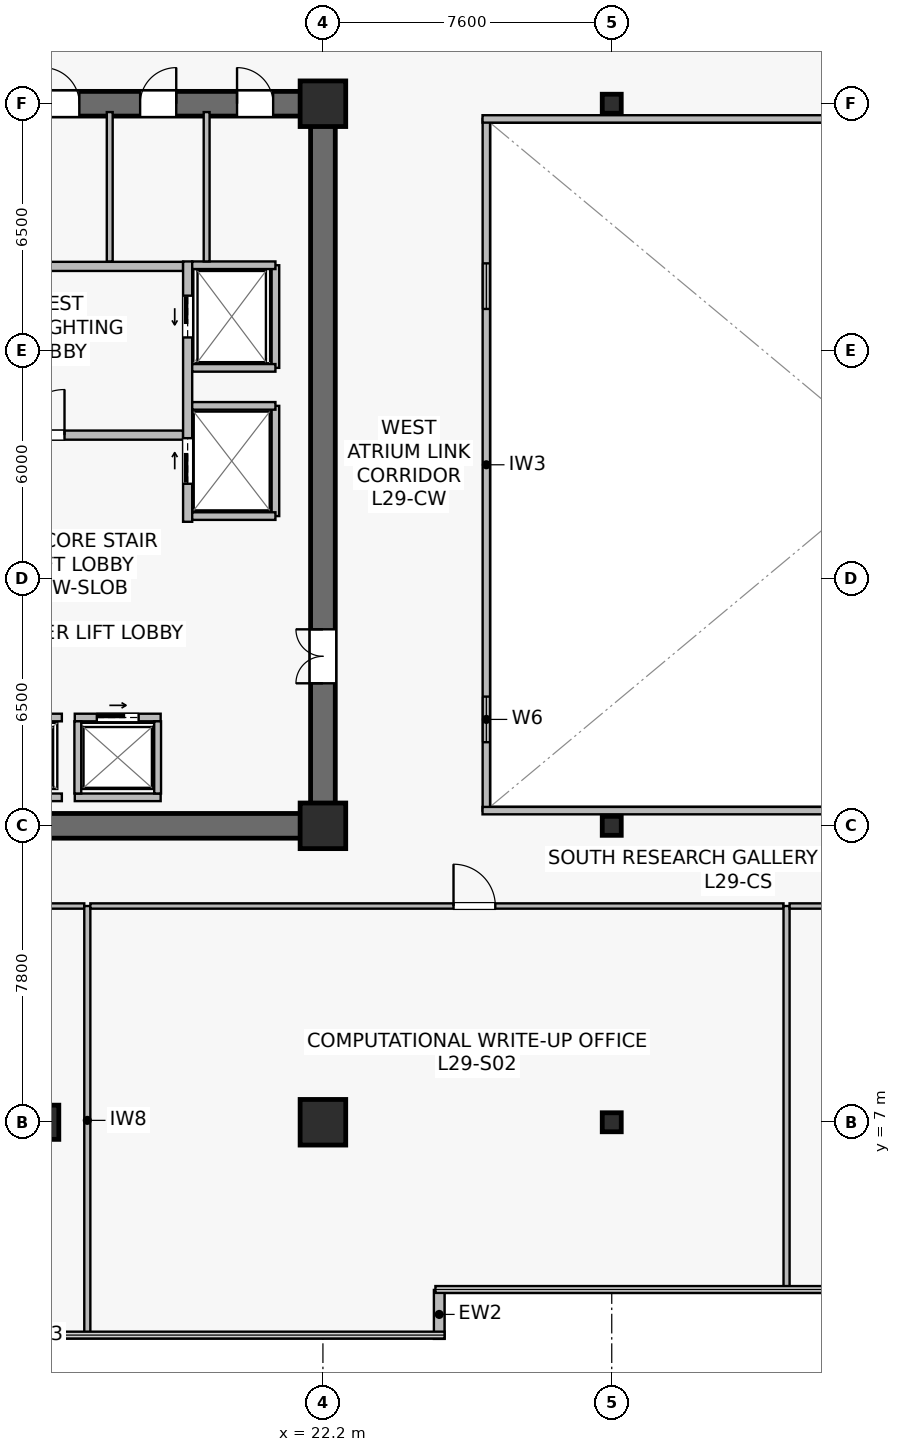
"""IFC4 building model, lengths in metres.
Left out: names, types, materials, properties, quantities, classifications, styles, units other than length and angle.
Written with IfcOpenShell. Run it as: python <this file> out.ifc"""

import sys

from ifc_helpers import new_model, si_unit, direction, frame, frame_2d, origin, origin_2d, place, context, subcontext, project, spatial, rectangle, hollow_rectangle, extrude, source, transform, mapped, element, fill, save


model = new_model("IFC4")
c1 = context("Model", 3, precision=1e-05, world=origin(), true_north=direction((0.0, 1.0)))
c2 = subcontext(c1, "Body", "Model", "MODEL_VIEW")
j1 = project(units=[si_unit("LENGTHUNIT", "METRE"), si_unit("PLANEANGLEUNIT", "RADIAN")], contexts=[c1])
p1 = place(None, origin())
s1 = spatial("IfcSite", under=j1, at=p1, CompositionType="ELEMENT")
p2 = place(p1, origin())
s2 = spatial("IfcBuilding", under=s1, at=p2, CompositionType="ELEMENT")
p3 = place(p2, frame((0.0, 0.0, 121.5)))
s3 = spatial("IfcBuildingStorey", under=s2, at=p3, CompositionType="ELEMENT", Elevation=121.5)
p4 = place(p3, frame((7.075, 14.8, 0.0), z_axis=(0.0, 0.0, 1.0), x_axis=(1.0, 0.0, 0.0)))
e1 = element("IfcWall", 1, at=p4, inside=s3, PredefinedType="SHEAR", context=c2, shape_type="SweptSolid", body=[
    extrude(rectangle(XDim=15.45, YDim=0.65, at=frame_2d((7.725, 0.0))), origin(), (0.0, 0.0, 1.0), 3.79),
])
p5 = place(p3, frame((7.075, 33.8, 0.0), z_axis=(0.0, 0.0, 1.0), x_axis=(1.0, 0.0, 0.0)))
e2 = element("IfcWall", 2, at=p5, inside=s3, PredefinedType="SHEAR", context=c2, shape_type="SweptSolid", body=[
    extrude(rectangle(XDim=15.45, YDim=0.65, at=frame_2d((7.725, 0.0))), origin(), (0.0, 0.0, 1.0), 3.79),
])
p6 = place(p5, frame((5.25, 0.0, 0.0)))
e3 = element("IfcOpeningElement", 3, at=p6, cuts=e2, PredefinedType="OPENING", context=c2, shape_type="SweptSolid", body=[
    extrude(rectangle(XDim=0.95, YDim=2.15, at=frame_2d((0.475, 1.075))), frame((0.0, 0.335, 0.0), z_axis=(0.0, -1.0, 0.0), x_axis=(1.0, 0.0, 0.0)), (0.0, 0.0, 1.0), 0.67),
])
p7 = place(p5, frame((7.765, 0.0, 0.0)))
e4 = element("IfcOpeningElement", 4, at=p7, cuts=e2, PredefinedType="OPENING", context=c2, shape_type="SweptSolid", body=[
    extrude(rectangle(XDim=0.95, YDim=2.15, at=frame_2d((0.475, 1.075))), frame((0.0, 0.335, 0.0), z_axis=(0.0, -1.0, 0.0), x_axis=(1.0, 0.0, 0.0)), (0.0, 0.0, 1.0), 0.67),
])
p8 = place(p5, frame((10.315, 0.0, 0.0)))
e5 = element("IfcOpeningElement", 5, at=p8, cuts=e2, PredefinedType="OPENING", context=c2, shape_type="SweptSolid", body=[
    extrude(rectangle(XDim=0.95, YDim=2.15, at=frame_2d((0.475, 1.075))), frame((0.0, 0.335, 0.0), z_axis=(0.0, -1.0, 0.0), x_axis=(1.0, 0.0, 0.0)), (0.0, 0.0, 1.0), 0.67),
])
p9 = place(p5, frame((12.865, 0.0, 0.0)))
e6 = element("IfcOpeningElement", 6, at=p9, cuts=e2, PredefinedType="OPENING", context=c2, shape_type="SweptSolid", body=[
    extrude(rectangle(XDim=0.95, YDim=2.15, at=frame_2d((0.475, 1.075))), frame((0.0, 0.335, 0.0), z_axis=(0.0, -1.0, 0.0), x_axis=(1.0, 0.0, 0.0)), (0.0, 0.0, 1.0), 0.67),
])
p10 = place(p3, frame((22.2, 15.125, 0.0), z_axis=(0.0, 0.0, 1.0), x_axis=(0.0, 1.0, 0.0)))
e7 = element("IfcWall", 7, at=p10, inside=s3, PredefinedType="SHEAR", context=c2, shape_type="SweptSolid", body=[
    extrude(rectangle(XDim=18.35, YDim=0.65, at=frame_2d((9.175, 0.0))), origin(), (0.0, 0.0, 1.0), 3.79),
])
p11 = place(p10, frame((3.425, 0.0, 0.0)))
e8 = element("IfcOpeningElement", 8, at=p11, cuts=e7, PredefinedType="OPENING", context=c2, shape_type="SweptSolid", body=[
    extrude(rectangle(XDim=1.42, YDim=2.2, at=frame_2d((0.71, 1.1))), frame((0.0, 0.335, 0.0), z_axis=(0.0, -1.0, 0.0), x_axis=(1.0, 0.0, 0.0)), (0.0, 0.0, 1.0), 0.67),
])
m1 = source(origin(), c2, "Body", "SweptSolid", [
    extrude(rectangle(XDim=0.9, YDim=0.9, at=origin_2d()), origin(), (0.0, 0.0, 1.0), 4.1),
])
p12 = place(p3, frame((14.8, 7.0, 0.0), z_axis=(0.0, 0.0, 1.0), x_axis=(1.0, 0.0, 0.0)))
e9 = element("IfcColumn", 9, at=p12, inside=s3, PredefinedType="COLUMN", context=c2, shape_type="MappedRepresentation", body=[
    mapped(m1, transform((0.0, 0.0, 0.0), scale=1.0)),
])
m2 = source(origin(), c2, "Body", "SweptSolid", [
    extrude(rectangle(XDim=1.2, YDim=1.2, at=origin_2d()), origin(), (0.0, 0.0, 1.0), 4.1),
])
for number, where, z_axis, x_axis in (
    (10, (22.2, 7.0, 0.0), (0.0, 0.0, 1.0), (1.0, 0.0, 0.0)),
    (11, (22.2, 14.8, 0.0), (0.0, 0.0, 1.0), (1.0, 0.0, 0.0)),
    (12, (22.2, 33.8, 0.0), (0.0, 0.0, 1.0), (1.0, 0.0, 0.0)),
):
    element("IfcColumn", number, at=place(p3, frame(where, z_axis=z_axis, x_axis=x_axis)), inside=s3, PredefinedType="COLUMN", context=c2, shape_type="MappedRepresentation", body=[
        mapped(m2, transform((0.0, 0.0, 0.0), scale=1.0)),
    ])
m3 = source(origin(), c2, "Body", "SweptSolid", [
    extrude(hollow_rectangle(XDim=0.5, YDim=0.5, WallThickness=0.022, at=origin_2d()), origin(), (0.0, 0.0, 1.0), 4.1),
])
for number, where, z_axis, x_axis in (
    (13, (29.8, 7.0, 0.0), (0.0, 0.0, 1.0), (1.0, 0.0, 0.0)),
    (14, (29.8, 14.8, 0.0), (0.0, 0.0, 1.0), (1.0, 0.0, 0.0)),
    (15, (29.8, 33.8, 0.0), (0.0, 0.0, 1.0), (1.0, 0.0, 0.0)),
):
    element("IfcColumn", number, at=place(p3, frame(where, z_axis=z_axis, x_axis=x_axis)), inside=s3, PredefinedType="COLUMN", context=c2, shape_type="MappedRepresentation", body=[
        mapped(m3, transform((0.0, 0.0, 0.0), scale=1.0)),
    ])
p13 = place(p3, frame((25.26, 1.3, 0.0), z_axis=(0.0, 0.0, 1.0), x_axis=(0.0, 1.0, 0.0)))
e16 = element("IfcWall", 16, at=p13, inside=s3, PredefinedType="STANDARD", context=c2, shape_type="SweptSolid", body=[
    extrude(rectangle(XDim=1.288, YDim=0.28, at=frame_2d((0.644, 0.0))), origin(), (0.0, 0.0, 1.0), 3.79),
])
p14 = place(p3, frame((11.6, 25.08, 0.0), z_axis=(0.0, 0.0, 1.0), x_axis=(1.0, 0.0, 0.0)))
e17 = element("IfcWall", 17, at=p14, inside=s3, PredefinedType="SOLIDWALL", context=c2, shape_type="SweptSolid", body=[
    extrude(rectangle(XDim=6.92, YDim=0.24, at=frame_2d((3.46, 0.0))), origin(), (0.0, 0.0, 1.0), 3.125),
])
p15 = place(p14, frame((2.6, 0.0, 0.0)))
e18 = element("IfcOpeningElement", 18, at=p15, cuts=e17, PredefinedType="OPENING", context=c2, shape_type="SweptSolid", body=[
    extrude(rectangle(XDim=1.2, YDim=2.16, at=frame_2d((0.6, 1.08))), frame((0.0, 0.13, 0.0), z_axis=(0.0, -1.0, 0.0), x_axis=(1.0, 0.0, 0.0)), (0.0, 0.0, 1.0), 0.26),
])
p16 = place(p3, frame((11.6, 29.52, 0.0), z_axis=(0.0, 0.0, 1.0), x_axis=(1.0, 0.0, 0.0)))
e19 = element("IfcWall", 19, at=p16, inside=s3, PredefinedType="SOLIDWALL", context=c2, shape_type="SweptSolid", body=[
    extrude(rectangle(XDim=6.92, YDim=0.24, at=frame_2d((3.46, 0.0))), origin(), (0.0, 0.0, 1.0), 3.125),
])
p17 = place(p3, frame((18.64, 22.8, 0.0), z_axis=(0.0, 0.0, 1.0), x_axis=(0.0, 1.0, 0.0)))
e20 = element("IfcWall", 20, at=p17, inside=s3, PredefinedType="SOLIDWALL", context=c2, shape_type="SweptSolid", body=[
    extrude(rectangle(XDim=6.85, YDim=0.24, at=frame_2d((3.425, 0.0))), origin(), (0.0, 0.0, 1.0), 2.875),
])
p18 = place(p17, frame((4.85, 0.0, 0.0)))
e21 = element("IfcOpeningElement", 21, at=p18, cuts=e20, PredefinedType="OPENING", context=c2, shape_type="SweptSolid", body=[
    extrude(rectangle(XDim=1.1, YDim=2.22, at=frame_2d((0.55, 1.11))), frame((0.0, 0.13, 0.0), z_axis=(0.0, -1.0, 0.0), x_axis=(1.0, 0.0, 0.0)), (0.0, 0.0, 1.0), 0.26),
])
p19 = place(p17, frame((1.0, 0.0, 0.0)))
e22 = element("IfcOpeningElement", 22, at=p19, cuts=e20, PredefinedType="OPENING", context=c2, shape_type="SweptSolid", body=[
    extrude(rectangle(XDim=1.2, YDim=2.22, at=frame_2d((0.6, 1.11))), frame((0.0, 0.13, 0.0), z_axis=(0.0, -1.0, 0.0), x_axis=(1.0, 0.0, 0.0)), (0.0, 0.0, 1.0), 0.26),
])
p20 = place(p3, frame((13.07, 17.65, 0.0), z_axis=(0.0, 0.0, 1.0), x_axis=(1.0, 0.0, 0.0)))
e23 = element("IfcWall", 23, at=p20, inside=s3, PredefinedType="SOLIDWALL", context=c2, shape_type="SweptSolid", body=[
    extrude(rectangle(XDim=2.26, YDim=0.2, at=frame_2d((1.13, 0.0))), origin(), (0.0, 0.0, 1.0), 3.125),
])
p21 = place(p20, frame((0.58, 0.0, 0.0)))
e24 = element("IfcOpeningElement", 24, at=p21, cuts=e23, PredefinedType="OPENING", context=c2, shape_type="SweptSolid", body=[
    extrude(rectangle(XDim=1.1, YDim=2.22, at=frame_2d((0.55, 1.11))), frame((0.0, 0.11, 0.0), z_axis=(0.0, -1.0, 0.0), x_axis=(1.0, 0.0, 0.0)), (0.0, 0.0, 1.0), 0.22),
])
p22 = place(p3, frame((13.07, 15.55, 0.0), z_axis=(0.0, 0.0, 1.0), x_axis=(1.0, 0.0, 0.0)))
e25 = element("IfcWall", 25, at=p22, inside=s3, PredefinedType="SOLIDWALL", context=c2, shape_type="SweptSolid", body=[
    extrude(rectangle(XDim=2.26, YDim=0.2, at=frame_2d((1.13, 0.0))), origin(), (0.0, 0.0, 1.0), 3.125),
])
p23 = place(p3, frame((15.67, 17.65, 0.0), z_axis=(0.0, 0.0, 1.0), x_axis=(1.0, 0.0, 0.0)))
e26 = element("IfcWall", 26, at=p23, inside=s3, PredefinedType="SOLIDWALL", context=c2, shape_type="SweptSolid", body=[
    extrude(rectangle(XDim=2.26, YDim=0.2, at=frame_2d((1.13, 0.0))), origin(), (0.0, 0.0, 1.0), 3.79),
])
p24 = place(p23, frame((0.58, 0.0, 0.0)))
e27 = element("IfcOpeningElement", 27, at=p24, cuts=e26, PredefinedType="OPENING", context=c2, shape_type="SweptSolid", body=[
    extrude(rectangle(XDim=1.1, YDim=2.22, at=frame_2d((0.55, 1.11))), frame((0.0, 0.11, 0.0), z_axis=(0.0, -1.0, 0.0), x_axis=(1.0, 0.0, 0.0)), (0.0, 0.0, 1.0), 0.22),
])
p25 = place(p3, frame((15.67, 15.55, 0.0), z_axis=(0.0, 0.0, 1.0), x_axis=(1.0, 0.0, 0.0)))
e28 = element("IfcWall", 28, at=p25, inside=s3, PredefinedType="SOLIDWALL", context=c2, shape_type="SweptSolid", body=[
    extrude(rectangle(XDim=2.26, YDim=0.2, at=frame_2d((1.13, 0.0))), origin(), (0.0, 0.0, 1.0), 3.79),
])
for number, where, z_axis, x_axis in (
    (29, (15.75, 15.65, 0.0), (0.0, 0.0, 1.0), (0.0, 1.0, 0.0)),
    (30, (17.85, 15.65, 0.0), (0.0, 0.0, 1.0), (0.0, 1.0, 0.0)),
):
    element("IfcWall", number, at=place(p3, frame(where, z_axis=z_axis, x_axis=x_axis)), inside=s3, PredefinedType="SOLIDWALL", context=c2, shape_type="SweptSolid", body=[
        extrude(rectangle(XDim=1.9, YDim=0.18, at=frame_2d((0.95, 0.0))), origin(), (0.0, 0.0, 1.0), 3.79),
    ])
p26 = place(p3, frame((20.95, 26.85, 0.0), z_axis=(0.0, 0.0, 1.0), x_axis=(0.0, 1.0, 0.0)))
e31 = element("IfcWall", 31, at=p26, inside=s3, PredefinedType="SOLIDWALL", context=c2, shape_type="SweptSolid", body=[
    extrude(rectangle(XDim=2.7, YDim=0.2, at=frame_2d((1.35, 0.0))), origin(), (0.0, 0.0, 1.0), 3.79),
])
p27 = place(p3, frame((18.76, 29.55, 0.0), z_axis=(0.0, 0.0, 1.0), x_axis=(1.0, 0.0, 0.0)))
e32 = element("IfcWall", 32, at=p27, inside=s3, PredefinedType="SOLIDWALL", context=c2, shape_type="SweptSolid", body=[
    extrude(rectangle(XDim=2.19, YDim=0.2, at=frame_2d((1.095, 0.0))), origin(), (0.0, 0.0, 1.0), 3.79),
])
p28 = place(p3, frame((18.76, 26.85, 0.0), z_axis=(0.0, 0.0, 1.0), x_axis=(1.0, 0.0, 0.0)))
e33 = element("IfcWall", 33, at=p28, inside=s3, PredefinedType="SOLIDWALL", context=c2, shape_type="SweptSolid", body=[
    extrude(rectangle(XDim=2.19, YDim=0.2, at=frame_2d((1.095, 0.0))), origin(), (0.0, 0.0, 1.0), 3.187),
])
p29 = place(p3, frame((20.95, 22.95, 0.0), z_axis=(0.0, 0.0, 1.0), x_axis=(0.0, 1.0, 0.0)))
e34 = element("IfcWall", 34, at=p29, inside=s3, PredefinedType="SOLIDWALL", context=c2, shape_type="SweptSolid", body=[
    extrude(rectangle(XDim=2.9, YDim=0.2, at=frame_2d((1.45, 0.0))), origin(), (0.0, 0.0, 1.0), 2.875),
])
for number, where, z_axis, x_axis in (
    (35, (18.76, 25.85, 0.0), (0.0, 0.0, 1.0), (1.0, 0.0, 0.0)),
    (36, (18.76, 22.95, 0.0), (0.0, 0.0, 1.0), (1.0, 0.0, 0.0)),
):
    element("IfcWall", number, at=place(p3, frame(where, z_axis=z_axis, x_axis=x_axis)), inside=s3, PredefinedType="SOLIDWALL", context=c2, shape_type="SweptSolid", body=[
        extrude(rectangle(XDim=2.19, YDim=0.2, at=frame_2d((1.095, 0.0))), origin(), (0.0, 0.0, 1.0), 3.79),
    ])
for number, where, z_axis, x_axis in (
    (37, (16.59, 29.65, 0.0), (0.0, 0.0, 1.0), (0.0, 1.0, 0.0)),
    (38, (19.14, 29.65, 0.0), (0.0, 0.0, 1.0), (0.0, 1.0, 0.0)),
):
    element("IfcWall", number, at=place(p3, frame(where, z_axis=z_axis, x_axis=x_axis)), inside=s3, PredefinedType="PLUMBINGWALL", context=c2, shape_type="SweptSolid", body=[
        extrude(rectangle(XDim=3.93, YDim=0.155, at=frame_2d((1.965, 0.0))), origin(), (0.0, 0.0, 1.0), 3.79),
    ])
p30 = place(p3, frame((26.5, 15.2, 0.0), z_axis=(0.0, 0.0, 1.0), x_axis=(0.0, 1.0, 0.0)))
e39 = element("IfcWall", 39, at=p30, inside=s3, PredefinedType="SOLIDWALL", context=c2, shape_type="SweptSolid", body=[
    extrude(rectangle(XDim=18.2, YDim=0.195, at=frame_2d((9.1, 0.0))), origin(), (0.0, 0.0, 1.0), 3.79),
])
p31 = place(p30, frame((1.8, 0.0, 0.9)))
e40 = element("IfcOpeningElement", 40, at=p31, cuts=e39, PredefinedType="OPENING", context=c2, shape_type="SweptSolid", body=[
    extrude(rectangle(XDim=1.2, YDim=1.35, at=frame_2d((0.6, 0.675))), frame((0.0, 0.107, 0.0), z_axis=(0.0, -1.0, 0.0), x_axis=(1.0, 0.0, 0.0)), (0.0, 0.0, 1.0), 0.215),
])
p32 = place(p30, frame((13.2, 0.0, 0.9)))
e41 = element("IfcOpeningElement", 41, at=p32, cuts=e39, PredefinedType="OPENING", context=c2, shape_type="SweptSolid", body=[
    extrude(rectangle(XDim=1.2, YDim=1.35, at=frame_2d((0.6, 0.675))), frame((0.0, 0.107, 0.0), z_axis=(0.0, -1.0, 0.0), x_axis=(1.0, 0.0, 0.0)), (0.0, 0.0, 1.0), 0.215),
])
for number, where, z_axis, x_axis in (
    (42, (26.4, 15.2, 0.0), (0.0, 0.0, 1.0), (1.0, 0.0, 0.0)),
    (43, (26.4, 33.4, 0.0), (0.0, 0.0, 1.0), (1.0, 0.0, 0.0)),
):
    element("IfcWall", number, at=place(p3, frame(where, z_axis=z_axis, x_axis=x_axis)), inside=s3, PredefinedType="SOLIDWALL", context=c2, shape_type="SweptSolid", body=[
        extrude(rectangle(XDim=22.0, YDim=0.195, at=frame_2d((11.0, 0.0))), origin(), (0.0, 0.0, 1.0), 3.79),
    ])
p33 = place(p3, frame((6.98, 12.69, 0.0), z_axis=(0.0, 0.0, 1.0), x_axis=(1.0, 0.0, 0.0)))
e44 = element("IfcWall", 44, at=p33, inside=s3, PredefinedType="PARTITIONING", context=c2, shape_type="SweptSolid", body=[
    extrude(rectangle(XDim=8.94, YDim=0.14, at=frame_2d((4.47, 0.0))), origin(), (0.0, 0.0, 1.0), 3.125),
])
p34 = place(p33, frame((3.492, 0.0, 0.0)))
e45 = element("IfcOpeningElement", 45, at=p34, cuts=e44, PredefinedType="OPENING", context=c2, shape_type="SweptSolid", body=[
    extrude(rectangle(XDim=1.1, YDim=2.18, at=frame_2d((0.55, 1.09))), frame((0.0, 0.08, 0.0), z_axis=(0.0, -1.0, 0.0), x_axis=(1.0, 0.0, 0.0)), (0.0, 0.0, 1.0), 0.16),
])
p35 = place(p3, frame((16.0, 1.41, 0.0), z_axis=(0.0, 0.0, 1.0), x_axis=(0.0, 1.0, 0.0)))
e46 = element("IfcWall", 46, at=p35, inside=s3, PredefinedType="PARTITIONING", context=c2, shape_type="SweptSolid", body=[
    extrude(rectangle(XDim=11.28, YDim=0.16, at=frame_2d((5.64, 0.0))), origin(), (0.0, 0.0, 1.0), 3.075),
])
p36 = place(p3, frame((16.08, 12.69, 0.0), z_axis=(0.0, 0.0, 1.0), x_axis=(1.0, 0.0, 0.0)))
e47 = element("IfcWall", 47, at=p36, inside=s3, PredefinedType="PARTITIONING", context=c2, shape_type="SweptSolid", body=[
    extrude(rectangle(XDim=18.24, YDim=0.14, at=frame_2d((9.12, 0.0))), origin(), (0.0, 0.0, 1.0), 3.125),
])
p37 = place(p36, frame((9.556, 0.0, 0.0)))
e48 = element("IfcOpeningElement", 48, at=p37, cuts=e47, PredefinedType="OPENING", context=c2, shape_type="SweptSolid", body=[
    extrude(rectangle(XDim=1.1, YDim=2.18, at=frame_2d((0.55, 1.09))), frame((0.0, 0.08, 0.0), z_axis=(0.0, -1.0, 0.0), x_axis=(1.0, 0.0, 0.0)), (0.0, 0.0, 1.0), 0.16),
])
p38 = place(p3, frame((34.4, 2.61, 0.0), z_axis=(0.0, 0.0, 1.0), x_axis=(0.0, 1.0, 0.0)))
e49 = element("IfcWall", 49, at=p38, inside=s3, PredefinedType="PARTITIONING", context=c2, shape_type="SweptSolid", body=[
    extrude(rectangle(XDim=10.08, YDim=0.16, at=frame_2d((5.04, 0.0))), origin(), (0.0, 0.0, 1.0), 3.075),
])
p39 = place(p3, frame((34.48, 12.69, 0.0), z_axis=(0.0, 0.0, 1.0), x_axis=(1.0, 0.0, 0.0)))
e50 = element("IfcWall", 50, at=p39, inside=s3, PredefinedType="PARTITIONING", context=c2, shape_type="SweptSolid", body=[
    extrude(rectangle(XDim=18.24, YDim=0.14, at=frame_2d((9.12, 0.0))), origin(), (0.0, 0.0, 1.0), 3.125),
])
p40 = place(p39, frame((7.583, 0.0, 0.0)))
e51 = element("IfcOpeningElement", 51, at=p40, cuts=e50, PredefinedType="OPENING", context=c2, shape_type="SweptSolid", body=[
    extrude(rectangle(XDim=1.1, YDim=2.18, at=frame_2d((0.55, 1.09))), frame((0.0, 0.08, 0.0), z_axis=(0.0, -1.0, 0.0), x_axis=(1.0, 0.0, 0.0)), (0.0, 0.0, 1.0), 0.16),
])
m4 = source(origin(), c2, "Body", "SweptSolid", [
    extrude(rectangle(XDim=1.2, YDim=1.35, at=frame_2d((0.6, 0.675))), frame((0.0, 0.03, 0.0), z_axis=(0.0, -1.0, 0.0), x_axis=(1.0, 0.0, 0.0)), (0.0, 0.0, 1.0), 0.06),
])
p41 = place(p31, origin())
e52 = element("IfcWindow", 52, at=p41, inside=s3, PartitioningType="SINGLE_PANEL", PredefinedType="WINDOW", context=c2, shape_type="MappedRepresentation", body=[
    mapped(m4, transform((0.0, 0.0, 0.0), scale=1.0)),
])
fill(e40, e52)
p42 = place(p32, origin())
e53 = element("IfcWindow", 53, at=p42, inside=s3, PartitioningType="SINGLE_PANEL", PredefinedType="WINDOW", context=c2, shape_type="MappedRepresentation", body=[
    mapped(m4, transform((0.0, 0.0, 0.0), scale=1.0)),
])
fill(e41, e53)
m5 = source(origin(), c2, "Body", "SweptSolid", [
    extrude(rectangle(XDim=1.2, YDim=2.16, at=frame_2d((0.6, 1.08))), frame((0.0, 0.025, 0.0), z_axis=(0.0, -1.0, 0.0), x_axis=(1.0, 0.0, 0.0)), (0.0, 0.0, 1.0), 0.05),
])
p43 = place(p15, origin())
e54 = element("IfcDoor", 54, at=p43, inside=s3, OperationType="SINGLE_SWING_RIGHT", PredefinedType="DOOR", context=c2, shape_type="MappedRepresentation", body=[
    mapped(m5, transform((0.0, 0.0, 0.0), scale=1.0)),
])
fill(e18, e54)
m6 = source(origin(), c2, "Body", "SweptSolid", [
    extrude(rectangle(XDim=1.1, YDim=2.22, at=frame_2d((0.55, 1.11))), frame((0.0, 0.025, 0.0), z_axis=(0.0, -1.0, 0.0), x_axis=(1.0, 0.0, 0.0)), (0.0, 0.0, 1.0), 0.05),
])
p44 = place(p24, origin())
e55 = element("IfcDoor", 55, at=p44, inside=s3, OperationType="SLIDING_TO_RIGHT", PredefinedType="USERDEFINED", context=c2, shape_type="MappedRepresentation", body=[
    mapped(m6, transform((0.0, 0.0, 0.0), scale=1.0)),
])
fill(e27, e55)
p45 = place(p18, origin())
e56 = element("IfcDoor", 56, at=p45, inside=s3, OperationType="SLIDING_TO_LEFT", PredefinedType="USERDEFINED", context=c2, shape_type="MappedRepresentation", body=[
    mapped(m6, transform((0.0, 0.0, 0.0), scale=1.0)),
])
fill(e21, e56)
m7 = source(origin(), c2, "Body", "SweptSolid", [
    extrude(rectangle(XDim=1.2, YDim=2.22, at=frame_2d((0.6, 1.11))), frame((0.0, 0.025, 0.0), z_axis=(0.0, -1.0, 0.0), x_axis=(1.0, 0.0, 0.0)), (0.0, 0.0, 1.0), 0.05),
])
p46 = place(p19, origin())
e57 = element("IfcDoor", 57, at=p46, inside=s3, OperationType="SLIDING_TO_RIGHT", PredefinedType="USERDEFINED", context=c2, shape_type="MappedRepresentation", body=[
    mapped(m7, transform((0.0, 0.0, 0.0), scale=1.0)),
])
fill(e22, e57)
m8 = source(origin(), c2, "Body", "SweptSolid", [
    extrude(rectangle(XDim=1.42, YDim=2.2, at=frame_2d((0.71, 1.1))), frame((0.0, 0.025, 0.0), z_axis=(0.0, -1.0, 0.0), x_axis=(1.0, 0.0, 0.0)), (0.0, 0.0, 1.0), 0.05),
])
p47 = place(p11, origin())
e58 = element("IfcDoor", 58, at=p47, inside=s3, OperationType="DOUBLE_DOOR_SINGLE_SWING", PredefinedType="DOOR", context=c2, shape_type="MappedRepresentation", body=[
    mapped(m8, transform((0.0, 0.0, 0.0), scale=1.0)),
])
fill(e8, e58)
m9 = source(origin(), c2, "Body", "SweptSolid", [
    extrude(rectangle(XDim=0.95, YDim=2.15, at=frame_2d((0.475, 1.075))), frame((0.0, 0.025, 0.0), z_axis=(0.0, -1.0, 0.0), x_axis=(1.0, 0.0, 0.0)), (0.0, 0.0, 1.0), 0.05),
])
p48 = place(p7, origin())
e59 = element("IfcDoor", 59, at=p48, inside=s3, OperationType="SINGLE_SWING_LEFT", PredefinedType="DOOR", context=c2, shape_type="MappedRepresentation", body=[
    mapped(m9, transform((0.0, 0.0, 0.0), scale=1.0)),
])
fill(e4, e59)
p49 = place(p8, origin())
e60 = element("IfcDoor", 60, at=p49, inside=s3, OperationType="SINGLE_SWING_RIGHT", PredefinedType="DOOR", context=c2, shape_type="MappedRepresentation", body=[
    mapped(m9, transform((0.0, 0.0, 0.0), scale=1.0)),
])
fill(e5, e60)
p50 = place(p9, origin())
e61 = element("IfcDoor", 61, at=p50, inside=s3, OperationType="SINGLE_SWING_LEFT", PredefinedType="DOOR", context=c2, shape_type="MappedRepresentation", body=[
    mapped(m9, transform((0.0, 0.0, 0.0), scale=1.0)),
])
fill(e6, e61)
m10 = source(origin(), c2, "Body", "SweptSolid", [
    extrude(rectangle(XDim=1.1, YDim=2.18, at=frame_2d((0.55, 1.09))), frame((0.0, 0.025, 0.0), z_axis=(0.0, -1.0, 0.0), x_axis=(1.0, 0.0, 0.0)), (0.0, 0.0, 1.0), 0.05),
])
p51 = place(p37, origin())
e62 = element("IfcDoor", 62, at=p51, inside=s3, OperationType="SINGLE_SWING_LEFT", PredefinedType="DOOR", context=c2, shape_type="MappedRepresentation", body=[
    mapped(m10, transform((0.0, 0.0, 0.0), scale=1.0)),
])
fill(e48, e62)
save(model, sys.argv[1])
